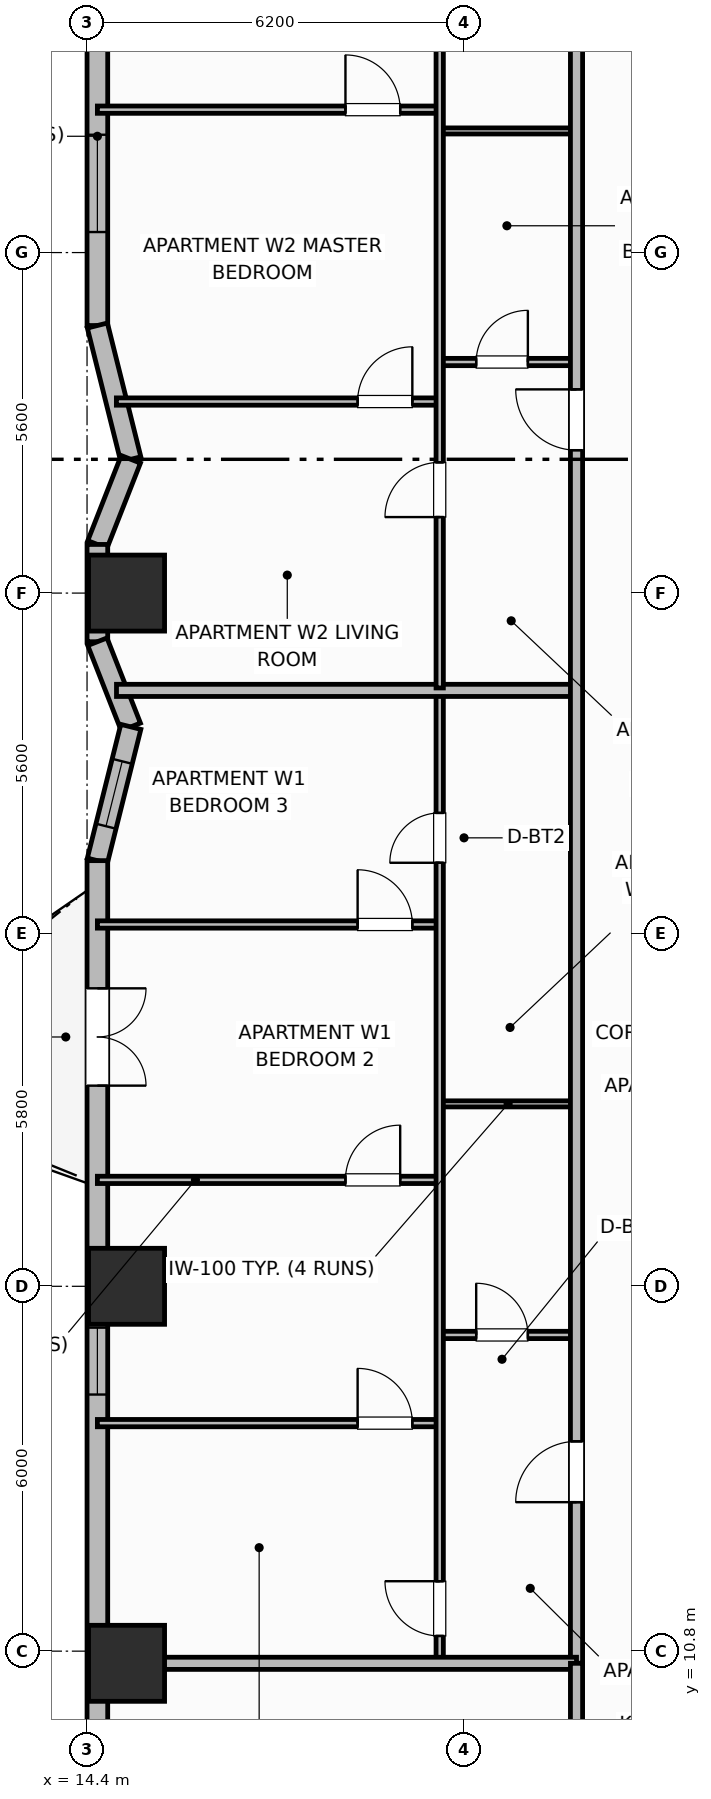
"""IFC4 building model, lengths in metres.
Left out: names, types, materials, properties, quantities, classifications, styles, units other than length and angle.
Written with IfcOpenShell. Run it as: python <this file> out.ifc"""

import sys

from ifc_helpers import new_model, si_unit, direction, frame, frame_2d, origin, origin_2d, place, context, subcontext, project, spatial, rectangle, extrude, element, fill, save


model = new_model("IFC4")
c1 = context("Model", 3, precision=1e-05, world=origin(), true_north=direction((0.0, 1.0)))
c2 = subcontext(c1, "Body", "Model", "MODEL_VIEW")
j1 = project(units=[si_unit("LENGTHUNIT", "METRE"), si_unit("PLANEANGLEUNIT", "RADIAN")], contexts=[c1])
p1 = place(None, origin())
s1 = spatial("IfcSite", under=j1, at=p1, CompositionType="ELEMENT")
p2 = place(p1, origin())
s2 = spatial("IfcBuilding", under=s1, at=p2, CompositionType="ELEMENT")
p3 = place(p2, frame((0.0, 0.0, 32.5)))
s3 = spatial("IfcBuildingStorey", under=s2, at=p3, CompositionType="ELEMENT", Elevation=32.5)
for number, where, z_axis, x_axis in (
    (1, (15.05, 10.6, 0.0), (0.0, 0.0, 1.0), (1.0, 0.0, 0.0)),
    (2, (15.05, 16.8, 0.0), (0.0, 0.0, 1.0), (1.0, 0.0, 0.0)),
    (3, (15.05, 28.2, 0.0), (0.0, 0.0, 1.0), (1.0, 0.0, 0.0)),
):
    element("IfcColumn", number, at=place(p3, frame(where, z_axis=z_axis, x_axis=x_axis)), inside=s3, PredefinedType="COLUMN", context=c2, shape_type="SweptSolid", body=[
        extrude(rectangle(XDim=1.25, YDim=1.25, at=origin_2d()), origin(), (0.0, 0.0, 1.0), 3.7),
    ])
p4 = place(p3, frame((14.57, 47.4, 0.0), z_axis=(0.0, 0.0, 1.0), x_axis=(0.0, -1.0, 0.0)))
e4 = element("IfcWall", 4, at=p4, inside=s3, PredefinedType="SOLIDWALL", context=c2, shape_type="SweptSolid", body=[
    extrude(rectangle(XDim=14.8, YDim=0.34, at=frame_2d((7.4, 0.0))), origin(), (0.0, 0.0, 1.0), 2.7),
])
p5 = place(p4, frame((4.212, 0.0, 0.68)))
e5 = element("IfcOpeningElement", 5, at=p5, cuts=e4, PredefinedType="OPENING", context=c2, shape_type="SweptSolid", body=[
    extrude(rectangle(XDim=1.6, YDim=1.9, at=frame_2d((0.8, 0.95))), frame((0.0, 0.18, 0.0), z_axis=(0.0, -1.0, 0.0), x_axis=(1.0, 0.0, 0.0)), (0.0, 0.0, 1.0), 0.36),
])
p6 = place(p4, frame((8.48, 0.0, 0.69)))
e6 = element("IfcOpeningElement", 6, at=p6, cuts=e4, PredefinedType="OPENING", context=c2, shape_type="SweptSolid", body=[
    extrude(rectangle(XDim=1.4, YDim=1.85, at=frame_2d((0.7, 0.925))), frame((0.0, 0.18, 0.0), z_axis=(0.0, -1.0, 0.0), x_axis=(1.0, 0.0, 0.0)), (0.0, 0.0, 1.0), 0.36),
])
p7 = place(p4, frame((11.663, 0.0, 0.68)))
e7 = element("IfcOpeningElement", 7, at=p7, cuts=e4, PredefinedType="OPENING", context=c2, shape_type="SweptSolid", body=[
    extrude(rectangle(XDim=1.6, YDim=1.9, at=frame_2d((0.8, 0.95))), frame((0.0, 0.18, 0.0), z_axis=(0.0, -1.0, 0.0), x_axis=(1.0, 0.0, 0.0)), (0.0, 0.0, 1.0), 0.36),
])
p8 = place(p3, frame((14.57, 32.6, 0.0), z_axis=(0.0, 0.0, 1.0), x_axis=(0.242535625036, -0.970142500145, 0.0)))
e8 = element("IfcWall", 8, at=p8, inside=s3, PredefinedType="SOLIDWALL", context=c2, shape_type="SweptSolid", body=[
    extrude(rectangle(XDim=2.268, YDim=0.34, at=frame_2d((1.134, 0.0))), origin(), (0.0, 0.0, 1.0), 2.7),
])
p9 = place(p3, frame((15.12, 30.4, 0.0), z_axis=(0.0, 0.0, 1.0), x_axis=(-0.365702591843, -0.930731762818, 0.0)))
e9 = element("IfcWall", 9, at=p9, inside=s3, PredefinedType="SOLIDWALL", context=c2, shape_type="SweptSolid", body=[
    extrude(rectangle(XDim=1.504, YDim=0.34, at=frame_2d((0.752, 0.0))), origin(), (0.0, 0.0, 1.0), 2.7),
])
p10 = place(p3, frame((14.57, 29.0, 0.0), z_axis=(0.0, 0.0, 1.0), x_axis=(0.0, -1.0, 0.0)))
e10 = element("IfcWall", 10, at=p10, inside=s3, PredefinedType="SOLIDWALL", context=c2, shape_type="SweptSolid", body=[
    extrude(rectangle(XDim=1.6, YDim=0.34, at=frame_2d((0.8, 0.0))), origin(), (0.0, 0.0, 1.0), 2.7),
])
p11 = place(p3, frame((14.57, 27.4, 0.0), z_axis=(0.0, 0.0, 1.0), x_axis=(0.365702591843, -0.930731762818, 0.0)))
e11 = element("IfcWall", 11, at=p11, inside=s3, PredefinedType="SOLIDWALL", context=c2, shape_type="SweptSolid", body=[
    extrude(rectangle(XDim=1.504, YDim=0.34, at=frame_2d((0.752, 0.0))), origin(), (0.0, 0.0, 1.0), 2.7),
])
p12 = place(p3, frame((15.12, 26.0, 0.0), z_axis=(0.0, 0.0, 1.0), x_axis=(-0.242560957029, -0.970136166796, 0.0)))
e12 = element("IfcWall", 12, at=p12, inside=s3, PredefinedType="SOLIDWALL", context=c2, shape_type="SweptSolid", body=[
    extrude(rectangle(XDim=2.268, YDim=0.34, at=frame_2d((1.134, 0.0))), origin(), (0.0, 0.0, 1.0), 2.7),
])
p13 = place(p12, frame((0.584, 0.0, 0.89)))
e13 = element("IfcOpeningElement", 13, at=p13, cuts=e12, PredefinedType="OPENING", context=c2, shape_type="SweptSolid", body=[
    extrude(rectangle(XDim=1.1, YDim=1.65, at=frame_2d((0.55, 0.825))), frame((0.0, 0.18, 0.0), z_axis=(0.0, -1.0, 0.0), x_axis=(1.0, 0.0, 0.0)), (0.0, 0.0, 1.0), 0.36),
])
p14 = place(p3, frame((14.57, 23.8, 0.0), z_axis=(0.0, 0.0, 1.0), x_axis=(0.0, -1.0, 0.0)))
e14 = element("IfcWall", 14, at=p14, inside=s3, PredefinedType="SOLIDWALL", context=c2, shape_type="SweptSolid", body=[
    extrude(rectangle(XDim=14.8, YDim=0.34, at=frame_2d((7.4, 0.0))), origin(), (0.0, 0.0, 1.0), 2.7),
])
p15 = place(p14, frame((2.1, 0.0, 0.0)))
e15 = element("IfcOpeningElement", 15, at=p15, cuts=e14, PredefinedType="OPENING", context=c2, shape_type="SweptSolid", body=[
    extrude(rectangle(XDim=1.6, YDim=2.1, at=frame_2d((0.8, 1.05))), frame((0.0, 0.18, 0.0), z_axis=(0.0, -1.0, 0.0), x_axis=(1.0, 0.0, 0.0)), (0.0, 0.0, 1.0), 0.36),
])
p16 = place(p14, frame((7.68, 0.0, 0.89)))
e16 = element("IfcOpeningElement", 16, at=p16, cuts=e14, PredefinedType="OPENING", context=c2, shape_type="SweptSolid", body=[
    extrude(rectangle(XDim=1.1, YDim=1.65, at=frame_2d((0.55, 0.825))), frame((0.0, 0.18, 0.0), z_axis=(0.0, -1.0, 0.0), x_axis=(1.0, 0.0, 0.0)), (0.0, 0.0, 1.0), 0.36),
])
p17 = place(p3, frame((20.2, 16.0, 0.0), z_axis=(0.0, 0.0, 1.0), x_axis=(1.0, 0.0, 0.0)))
e17 = element("IfcWall", 17, at=p17, inside=s3, PredefinedType="PARTITIONING", context=c2, shape_type="SweptSolid", body=[
    extrude(rectangle(XDim=2.25, YDim=0.12, at=frame_2d((1.125, 0.0))), origin(), (0.0, 0.0, 1.0), 2.53),
])
p18 = place(p17, frame((0.6, 0.0, 0.0)))
e18 = element("IfcOpeningElement", 18, at=p18, cuts=e17, PredefinedType="OPENING", context=c2, shape_type="SweptSolid", body=[
    extrude(rectangle(XDim=0.85, YDim=2.1, at=frame_2d((0.425, 1.05))), frame((0.0, 0.07, 0.0), z_axis=(0.0, -1.0, 0.0), x_axis=(1.0, 0.0, 0.0)), (0.0, 0.0, 1.0), 0.14),
])
p19 = place(p3, frame((20.2, 19.8, 0.0), z_axis=(0.0, 0.0, 1.0), x_axis=(1.0, 0.0, 0.0)))
e19 = element("IfcWall", 19, at=p19, inside=s3, PredefinedType="PARTITIONING", context=c2, shape_type="SweptSolid", body=[
    extrude(rectangle(XDim=2.25, YDim=0.1, at=frame_2d((1.125, 0.0))), origin(), (0.0, 0.0, 1.0), 2.53),
])
p20 = place(p3, frame((14.57, 14.55, 0.0), z_axis=(0.0, 0.0, 1.0), x_axis=(1.0, 0.0, 0.0)))
e20 = element("IfcWall", 20, at=p20, inside=s3, PredefinedType="PARTITIONING", context=c2, shape_type="SweptSolid", body=[
    extrude(rectangle(XDim=5.63, YDim=0.12, at=frame_2d((2.815, 0.0))), origin(), (0.0, 0.0, 1.0), 2.53),
])
p21 = place(p20, frame((4.28, 0.0, 0.0)))
e21 = element("IfcOpeningElement", 21, at=p21, cuts=e20, PredefinedType="OPENING", context=c2, shape_type="SweptSolid", body=[
    extrude(rectangle(XDim=0.9, YDim=2.1, at=frame_2d((0.45, 1.05))), frame((0.0, 0.07, 0.0), z_axis=(0.0, -1.0, 0.0), x_axis=(1.0, 0.0, 0.0)), (0.0, 0.0, 1.0), 0.14),
])
p22 = place(p3, frame((14.57, 18.55, 0.0), z_axis=(0.0, 0.0, 1.0), x_axis=(1.0, 0.0, 0.0)))
e22 = element("IfcWall", 22, at=p22, inside=s3, PredefinedType="PARTITIONING", context=c2, shape_type="SweptSolid", body=[
    extrude(rectangle(XDim=5.63, YDim=0.12, at=frame_2d((2.815, 0.0))), origin(), (0.0, 0.0, 1.0), 2.53),
])
p23 = place(p22, frame((4.08, 0.0, 0.0)))
e23 = element("IfcOpeningElement", 23, at=p23, cuts=e22, PredefinedType="OPENING", context=c2, shape_type="SweptSolid", body=[
    extrude(rectangle(XDim=0.9, YDim=2.1, at=frame_2d((0.45, 1.05))), frame((0.0, 0.07, 0.0), z_axis=(0.0, -1.0, 0.0), x_axis=(1.0, 0.0, 0.0)), (0.0, 0.0, 1.0), 0.14),
])
p24 = place(p3, frame((14.57, 22.75, 0.0), z_axis=(0.0, 0.0, 1.0), x_axis=(1.0, 0.0, 0.0)))
e24 = element("IfcWall", 24, at=p24, inside=s3, PredefinedType="PARTITIONING", context=c2, shape_type="SweptSolid", body=[
    extrude(rectangle(XDim=5.63, YDim=0.12, at=frame_2d((2.815, 0.0))), origin(), (0.0, 0.0, 1.0), 2.53),
])
p25 = place(p24, frame((4.28, 0.0, 0.0)))
e25 = element("IfcOpeningElement", 25, at=p25, cuts=e24, PredefinedType="OPENING", context=c2, shape_type="SweptSolid", body=[
    extrude(rectangle(XDim=0.9, YDim=2.1, at=frame_2d((0.45, 1.05))), frame((0.0, 0.07, 0.0), z_axis=(0.0, -1.0, 0.0), x_axis=(1.0, 0.0, 0.0)), (0.0, 0.0, 1.0), 0.14),
])
p26 = place(p3, frame((20.2, 10.64, 0.0), z_axis=(0.0, 0.0, 1.0), x_axis=(0.0, 1.0, 0.0)))
e26 = element("IfcWall", 26, at=p26, inside=s3, PredefinedType="PARTITIONING", context=c2, shape_type="SweptSolid", body=[
    extrude(rectangle(XDim=15.92, YDim=0.12, at=frame_2d((7.96, 0.0))), origin(), (0.0, 0.0, 1.0), 2.53),
])
p27 = place(p26, frame((0.41, 0.0, 0.0)))
e27 = element("IfcOpeningElement", 27, at=p27, cuts=e26, PredefinedType="OPENING", context=c2, shape_type="SweptSolid", body=[
    extrude(rectangle(XDim=0.9, YDim=2.1, at=frame_2d((0.45, 1.05))), frame((0.0, 0.07, 0.0), z_axis=(0.0, -1.0, 0.0), x_axis=(1.0, 0.0, 0.0)), (0.0, 0.0, 1.0), 0.14),
])
p28 = place(p26, frame((13.125, 0.0, 0.0)))
e28 = element("IfcOpeningElement", 28, at=p28, cuts=e26, PredefinedType="OPENING", context=c2, shape_type="SweptSolid", body=[
    extrude(rectangle(XDim=0.82, YDim=2.08, at=frame_2d((0.41, 1.04))), frame((0.0, 0.07, 0.0), z_axis=(0.0, -1.0, 0.0), x_axis=(1.0, 0.0, 0.0)), (0.0, 0.0, 1.0), 0.14),
])
p29 = place(p3, frame((14.884, 26.6, 0.0), z_axis=(0.0, 0.0, 1.0), x_axis=(1.0, 0.0, 0.0)))
e29 = element("IfcWall", 29, at=p29, inside=s3, PredefinedType="PARTITIONING", context=c2, shape_type="SweptSolid", body=[
    extrude(rectangle(XDim=7.566, YDim=0.2, at=frame_2d((3.783, 0.0))), origin(), (0.0, 0.0, 1.0), 2.53),
])
p30 = place(p3, frame((20.2, 32.0, 0.0), z_axis=(0.0, 0.0, 1.0), x_axis=(1.0, 0.0, 0.0)))
e30 = element("IfcWall", 30, at=p30, inside=s3, PredefinedType="PARTITIONING", context=c2, shape_type="SweptSolid", body=[
    extrude(rectangle(XDim=2.25, YDim=0.12, at=frame_2d((1.125, 0.0))), origin(), (0.0, 0.0, 1.0), 2.53),
])
p31 = place(p30, frame((0.6, 0.0, 0.0)))
e31 = element("IfcOpeningElement", 31, at=p31, cuts=e30, PredefinedType="OPENING", context=c2, shape_type="SweptSolid", body=[
    extrude(rectangle(XDim=0.85, YDim=2.1, at=frame_2d((0.425, 1.05))), frame((0.0, 0.07, 0.0), z_axis=(0.0, -1.0, 0.0), x_axis=(1.0, 0.0, 0.0)), (0.0, 0.0, 1.0), 0.14),
])
p32 = place(p3, frame((20.2, 35.8, 0.0), z_axis=(0.0, 0.0, 1.0), x_axis=(1.0, 0.0, 0.0)))
e32 = element("IfcWall", 32, at=p32, inside=s3, PredefinedType="PARTITIONING", context=c2, shape_type="SweptSolid", body=[
    extrude(rectangle(XDim=2.25, YDim=0.1, at=frame_2d((1.125, 0.0))), origin(), (0.0, 0.0, 1.0), 2.53),
])
p33 = place(p3, frame((14.883, 31.35, 0.0), z_axis=(0.0, 0.0, 1.0), x_axis=(1.0, 0.0, 0.0)))
e33 = element("IfcWall", 33, at=p33, inside=s3, PredefinedType="PARTITIONING", context=c2, shape_type="SweptSolid", body=[
    extrude(rectangle(XDim=5.317, YDim=0.12, at=frame_2d((2.659, 0.0))), origin(), (0.0, 0.0, 1.0), 2.53),
])
p34 = place(p33, frame((3.968, 0.0, 0.0)))
e34 = element("IfcOpeningElement", 34, at=p34, cuts=e33, PredefinedType="OPENING", context=c2, shape_type="SweptSolid", body=[
    extrude(rectangle(XDim=0.9, YDim=2.1, at=frame_2d((0.45, 1.05))), frame((0.0, 0.07, 0.0), z_axis=(0.0, -1.0, 0.0), x_axis=(1.0, 0.0, 0.0)), (0.0, 0.0, 1.0), 0.14),
])
p35 = place(p3, frame((14.57, 36.15, 0.0), z_axis=(0.0, 0.0, 1.0), x_axis=(1.0, 0.0, 0.0)))
e35 = element("IfcWall", 35, at=p35, inside=s3, PredefinedType="PARTITIONING", context=c2, shape_type="SweptSolid", body=[
    extrude(rectangle(XDim=5.63, YDim=0.12, at=frame_2d((2.815, 0.0))), origin(), (0.0, 0.0, 1.0), 2.53),
])
p36 = place(p35, frame((4.08, 0.0, 0.0)))
e36 = element("IfcOpeningElement", 36, at=p36, cuts=e35, PredefinedType="OPENING", context=c2, shape_type="SweptSolid", body=[
    extrude(rectangle(XDim=0.9, YDim=2.1, at=frame_2d((0.45, 1.05))), frame((0.0, 0.07, 0.0), z_axis=(0.0, -1.0, 0.0), x_axis=(1.0, 0.0, 0.0)), (0.0, 0.0, 1.0), 0.14),
])
p37 = place(p3, frame((20.2, 26.64, 0.0), z_axis=(0.0, 0.0, 1.0), x_axis=(0.0, 1.0, 0.0)))
e37 = element("IfcWall", 37, at=p37, inside=s3, PredefinedType="PARTITIONING", context=c2, shape_type="SweptSolid", body=[
    extrude(rectangle(XDim=19.12, YDim=0.12, at=frame_2d((9.56, 0.0))), origin(), (0.0, 0.0, 1.0), 2.53),
])
p38 = place(p37, frame((2.81, 0.0, 0.0)))
e38 = element("IfcOpeningElement", 38, at=p38, cuts=e37, PredefinedType="OPENING", context=c2, shape_type="SweptSolid", body=[
    extrude(rectangle(XDim=0.9, YDim=2.1, at=frame_2d((0.45, 1.05))), frame((0.0, 0.07, 0.0), z_axis=(0.0, -1.0, 0.0), x_axis=(1.0, 0.0, 0.0)), (0.0, 0.0, 1.0), 0.14),
])
p39 = place(p37, frame((16.18, 0.0, 0.0)))
e39 = element("IfcOpeningElement", 39, at=p39, cuts=e37, PredefinedType="OPENING", context=c2, shape_type="SweptSolid", body=[
    extrude(rectangle(XDim=0.82, YDim=2.08, at=frame_2d((0.41, 1.04))), frame((0.0, 0.07, 0.0), z_axis=(0.0, -1.0, 0.0), x_axis=(1.0, 0.0, 0.0)), (0.0, 0.0, 1.0), 0.14),
])
p40 = place(p3, frame((22.45, 10.6, 0.0), z_axis=(0.0, 0.0, 1.0), x_axis=(0.0, 1.0, 0.0)))
e40 = element("IfcWall", 40, at=p40, inside=s3, PredefinedType="PARTITIONING", context=c2, shape_type="SweptSolid", body=[
    extrude(rectangle(XDim=35.2, YDim=0.2, at=frame_2d((17.6, 0.0))), origin(), (0.0, 0.0, 1.0), 2.53),
])
p41 = place(p40, frame((2.65, 0.0, 0.0)))
e41 = element("IfcOpeningElement", 41, at=p41, cuts=e40, PredefinedType="OPENING", context=c2, shape_type="SweptSolid", body=[
    extrude(rectangle(XDim=1.0, YDim=2.15, at=frame_2d((0.5, 1.075))), frame((0.0, 0.11, 0.0), z_axis=(0.0, -1.0, 0.0), x_axis=(1.0, 0.0, 0.0)), (0.0, 0.0, 1.0), 0.22),
])
p42 = place(p40, frame((19.95, 0.0, 0.0)))
e42 = element("IfcOpeningElement", 42, at=p42, cuts=e40, PredefinedType="OPENING", context=c2, shape_type="SweptSolid", body=[
    extrude(rectangle(XDim=1.0, YDim=2.15, at=frame_2d((0.5, 1.075))), frame((0.0, 0.11, 0.0), z_axis=(0.0, -1.0, 0.0), x_axis=(1.0, 0.0, 0.0)), (0.0, 0.0, 1.0), 0.22),
])
p43 = place(p3, frame((14.99, 10.6, 0.0), z_axis=(0.0, 0.0, 1.0), x_axis=(1.0, 0.0, 0.0)))
e43 = element("IfcWall", 43, at=p43, inside=s3, PredefinedType="PARTITIONING", context=c2, shape_type="SweptSolid", body=[
    extrude(rectangle(XDim=7.46, YDim=0.2, at=frame_2d((3.73, 0.0))), origin(), (0.0, 0.0, 1.0), 2.53),
])
p44 = place(p3, frame((22.45, 4.97, 0.0), z_axis=(0.0, 0.0, 1.0), x_axis=(0.0, 1.0, 0.0)))
e44 = element("IfcWall", 44, at=p44, inside=s3, PredefinedType="PARTITIONING", context=c2, shape_type="SweptSolid", body=[
    extrude(rectangle(XDim=5.63, YDim=0.2, at=frame_2d((2.815, 0.0))), origin(), (0.0, 0.0, 1.0), 2.53),
])
p45 = place(p7, origin())
e45 = element("IfcWindow", 45, at=p45, inside=s3, PartitioningType="SINGLE_PANEL", PredefinedType="WINDOW", context=c2, shape_type="SweptSolid", body=[
    extrude(rectangle(XDim=1.6, YDim=1.9, at=frame_2d((0.8, 0.95))), frame((0.0, 0.03, 0.0), z_axis=(0.0, -1.0, 0.0), x_axis=(1.0, 0.0, 0.0)), (0.0, 0.0, 1.0), 0.06),
])
fill(e7, e45)
p46 = place(p13, origin())
e46 = element("IfcWindow", 46, at=p46, inside=s3, PartitioningType="SINGLE_PANEL", PredefinedType="WINDOW", context=c2, shape_type="SweptSolid", body=[
    extrude(rectangle(XDim=1.1, YDim=1.65, at=frame_2d((0.55, 0.825))), frame((0.0, 0.03, 0.0), z_axis=(0.0, -1.0, 0.0), x_axis=(1.0, 0.0, 0.0)), (0.0, 0.0, 1.0), 0.06),
])
fill(e13, e46)
p47 = place(p15, origin())
e47 = element("IfcDoor", 47, at=p47, inside=s3, OperationType="DOUBLE_DOOR_SINGLE_SWING", PredefinedType="DOOR", context=c2, shape_type="SweptSolid", body=[
    extrude(rectangle(XDim=1.6, YDim=2.1, at=frame_2d((0.8, 1.05))), frame((0.0, 0.025, 0.0), z_axis=(0.0, -1.0, 0.0), x_axis=(1.0, 0.0, 0.0)), (0.0, 0.0, 1.0), 0.05),
])
fill(e15, e47)
p48 = place(p16, origin())
e48 = element("IfcWindow", 48, at=p48, inside=s3, PartitioningType="SINGLE_PANEL", PredefinedType="WINDOW", context=c2, shape_type="SweptSolid", body=[
    extrude(rectangle(XDim=1.1, YDim=1.65, at=frame_2d((0.55, 0.825))), frame((0.0, 0.03, 0.0), z_axis=(0.0, -1.0, 0.0), x_axis=(1.0, 0.0, 0.0)), (0.0, 0.0, 1.0), 0.06),
])
fill(e16, e48)
p49 = place(p18, origin())
e49 = element("IfcDoor", 49, at=p49, inside=s3, OperationType="SINGLE_SWING_LEFT", PredefinedType="DOOR", context=c2, shape_type="SweptSolid", body=[
    extrude(rectangle(XDim=0.85, YDim=2.1, at=frame_2d((0.425, 1.05))), frame((0.0, 0.025, 0.0), z_axis=(0.0, -1.0, 0.0), x_axis=(1.0, 0.0, 0.0)), (0.0, 0.0, 1.0), 0.05),
])
fill(e18, e49)
p50 = place(p21, origin())
e50 = element("IfcDoor", 50, at=p50, inside=s3, OperationType="SINGLE_SWING_LEFT", PredefinedType="DOOR", context=c2, shape_type="SweptSolid", body=[
    extrude(rectangle(XDim=0.9, YDim=2.1, at=frame_2d((0.45, 1.05))), frame((0.0, 0.025, 0.0), z_axis=(0.0, -1.0, 0.0), x_axis=(1.0, 0.0, 0.0)), (0.0, 0.0, 1.0), 0.05),
])
fill(e21, e50)
p51 = place(p23, origin())
e51 = element("IfcDoor", 51, at=p51, inside=s3, OperationType="SINGLE_SWING_RIGHT", PredefinedType="DOOR", context=c2, shape_type="SweptSolid", body=[
    extrude(rectangle(XDim=0.9, YDim=2.1, at=frame_2d((0.45, 1.05))), frame((0.0, 0.025, 0.0), z_axis=(0.0, -1.0, 0.0), x_axis=(1.0, 0.0, 0.0)), (0.0, 0.0, 1.0), 0.05),
])
fill(e23, e51)
p52 = place(p25, origin())
e52 = element("IfcDoor", 52, at=p52, inside=s3, OperationType="SINGLE_SWING_LEFT", PredefinedType="DOOR", context=c2, shape_type="SweptSolid", body=[
    extrude(rectangle(XDim=0.9, YDim=2.1, at=frame_2d((0.45, 1.05))), frame((0.0, 0.025, 0.0), z_axis=(0.0, -1.0, 0.0), x_axis=(1.0, 0.0, 0.0)), (0.0, 0.0, 1.0), 0.05),
])
fill(e25, e52)
p53 = place(p27, origin())
e53 = element("IfcDoor", 53, at=p53, inside=s3, OperationType="SINGLE_SWING_RIGHT", PredefinedType="DOOR", context=c2, shape_type="SweptSolid", body=[
    extrude(rectangle(XDim=0.9, YDim=2.1, at=frame_2d((0.45, 1.05))), frame((0.0, 0.025, 0.0), z_axis=(0.0, -1.0, 0.0), x_axis=(1.0, 0.0, 0.0)), (0.0, 0.0, 1.0), 0.05),
])
fill(e27, e53)
p54 = place(p28, origin())
e54 = element("IfcDoor", 54, at=p54, inside=s3, OperationType="SINGLE_SWING_LEFT", PredefinedType="DOOR", context=c2, shape_type="SweptSolid", body=[
    extrude(rectangle(XDim=0.82, YDim=2.08, at=frame_2d((0.41, 1.04))), frame((0.0, 0.025, 0.0), z_axis=(0.0, -1.0, 0.0), x_axis=(1.0, 0.0, 0.0)), (0.0, 0.0, 1.0), 0.05),
])
fill(e28, e54)
p55 = place(p31, origin())
e55 = element("IfcDoor", 55, at=p55, inside=s3, OperationType="SINGLE_SWING_RIGHT", PredefinedType="DOOR", context=c2, shape_type="SweptSolid", body=[
    extrude(rectangle(XDim=0.85, YDim=2.1, at=frame_2d((0.425, 1.05))), frame((0.0, 0.025, 0.0), z_axis=(0.0, -1.0, 0.0), x_axis=(1.0, 0.0, 0.0)), (0.0, 0.0, 1.0), 0.05),
])
fill(e31, e55)
p56 = place(p34, origin())
e56 = element("IfcDoor", 56, at=p56, inside=s3, OperationType="SINGLE_SWING_RIGHT", PredefinedType="DOOR", context=c2, shape_type="SweptSolid", body=[
    extrude(rectangle(XDim=0.9, YDim=2.1, at=frame_2d((0.45, 1.05))), frame((0.0, 0.025, 0.0), z_axis=(0.0, -1.0, 0.0), x_axis=(1.0, 0.0, 0.0)), (0.0, 0.0, 1.0), 0.05),
])
fill(e34, e56)
p57 = place(p36, origin())
e57 = element("IfcDoor", 57, at=p57, inside=s3, OperationType="SINGLE_SWING_LEFT", PredefinedType="DOOR", context=c2, shape_type="SweptSolid", body=[
    extrude(rectangle(XDim=0.9, YDim=2.1, at=frame_2d((0.45, 1.05))), frame((0.0, 0.025, 0.0), z_axis=(0.0, -1.0, 0.0), x_axis=(1.0, 0.0, 0.0)), (0.0, 0.0, 1.0), 0.05),
])
fill(e36, e57)
p58 = place(p38, origin())
e58 = element("IfcDoor", 58, at=p58, inside=s3, OperationType="SINGLE_SWING_LEFT", PredefinedType="DOOR", context=c2, shape_type="SweptSolid", body=[
    extrude(rectangle(XDim=0.9, YDim=2.1, at=frame_2d((0.45, 1.05))), frame((0.0, 0.025, 0.0), z_axis=(0.0, -1.0, 0.0), x_axis=(1.0, 0.0, 0.0)), (0.0, 0.0, 1.0), 0.05),
])
fill(e38, e58)
p59 = place(p41, origin())
e59 = element("IfcDoor", 59, at=p59, inside=s3, OperationType="SINGLE_SWING_LEFT", PredefinedType="DOOR", context=c2, shape_type="SweptSolid", body=[
    extrude(rectangle(XDim=1.0, YDim=2.15, at=frame_2d((0.5, 1.075))), frame((0.0, 0.025, 0.0), z_axis=(0.0, -1.0, 0.0), x_axis=(1.0, 0.0, 0.0)), (0.0, 0.0, 1.0), 0.05),
])
fill(e41, e59)
p60 = place(p42, origin())
e60 = element("IfcDoor", 60, at=p60, inside=s3, OperationType="SINGLE_SWING_RIGHT", PredefinedType="DOOR", context=c2, shape_type="SweptSolid", body=[
    extrude(rectangle(XDim=1.0, YDim=2.15, at=frame_2d((0.5, 1.075))), frame((0.0, 0.025, 0.0), z_axis=(0.0, -1.0, 0.0), x_axis=(1.0, 0.0, 0.0)), (0.0, 0.0, 1.0), 0.05),
])
fill(e42, e60)
save(model, sys.argv[1])
